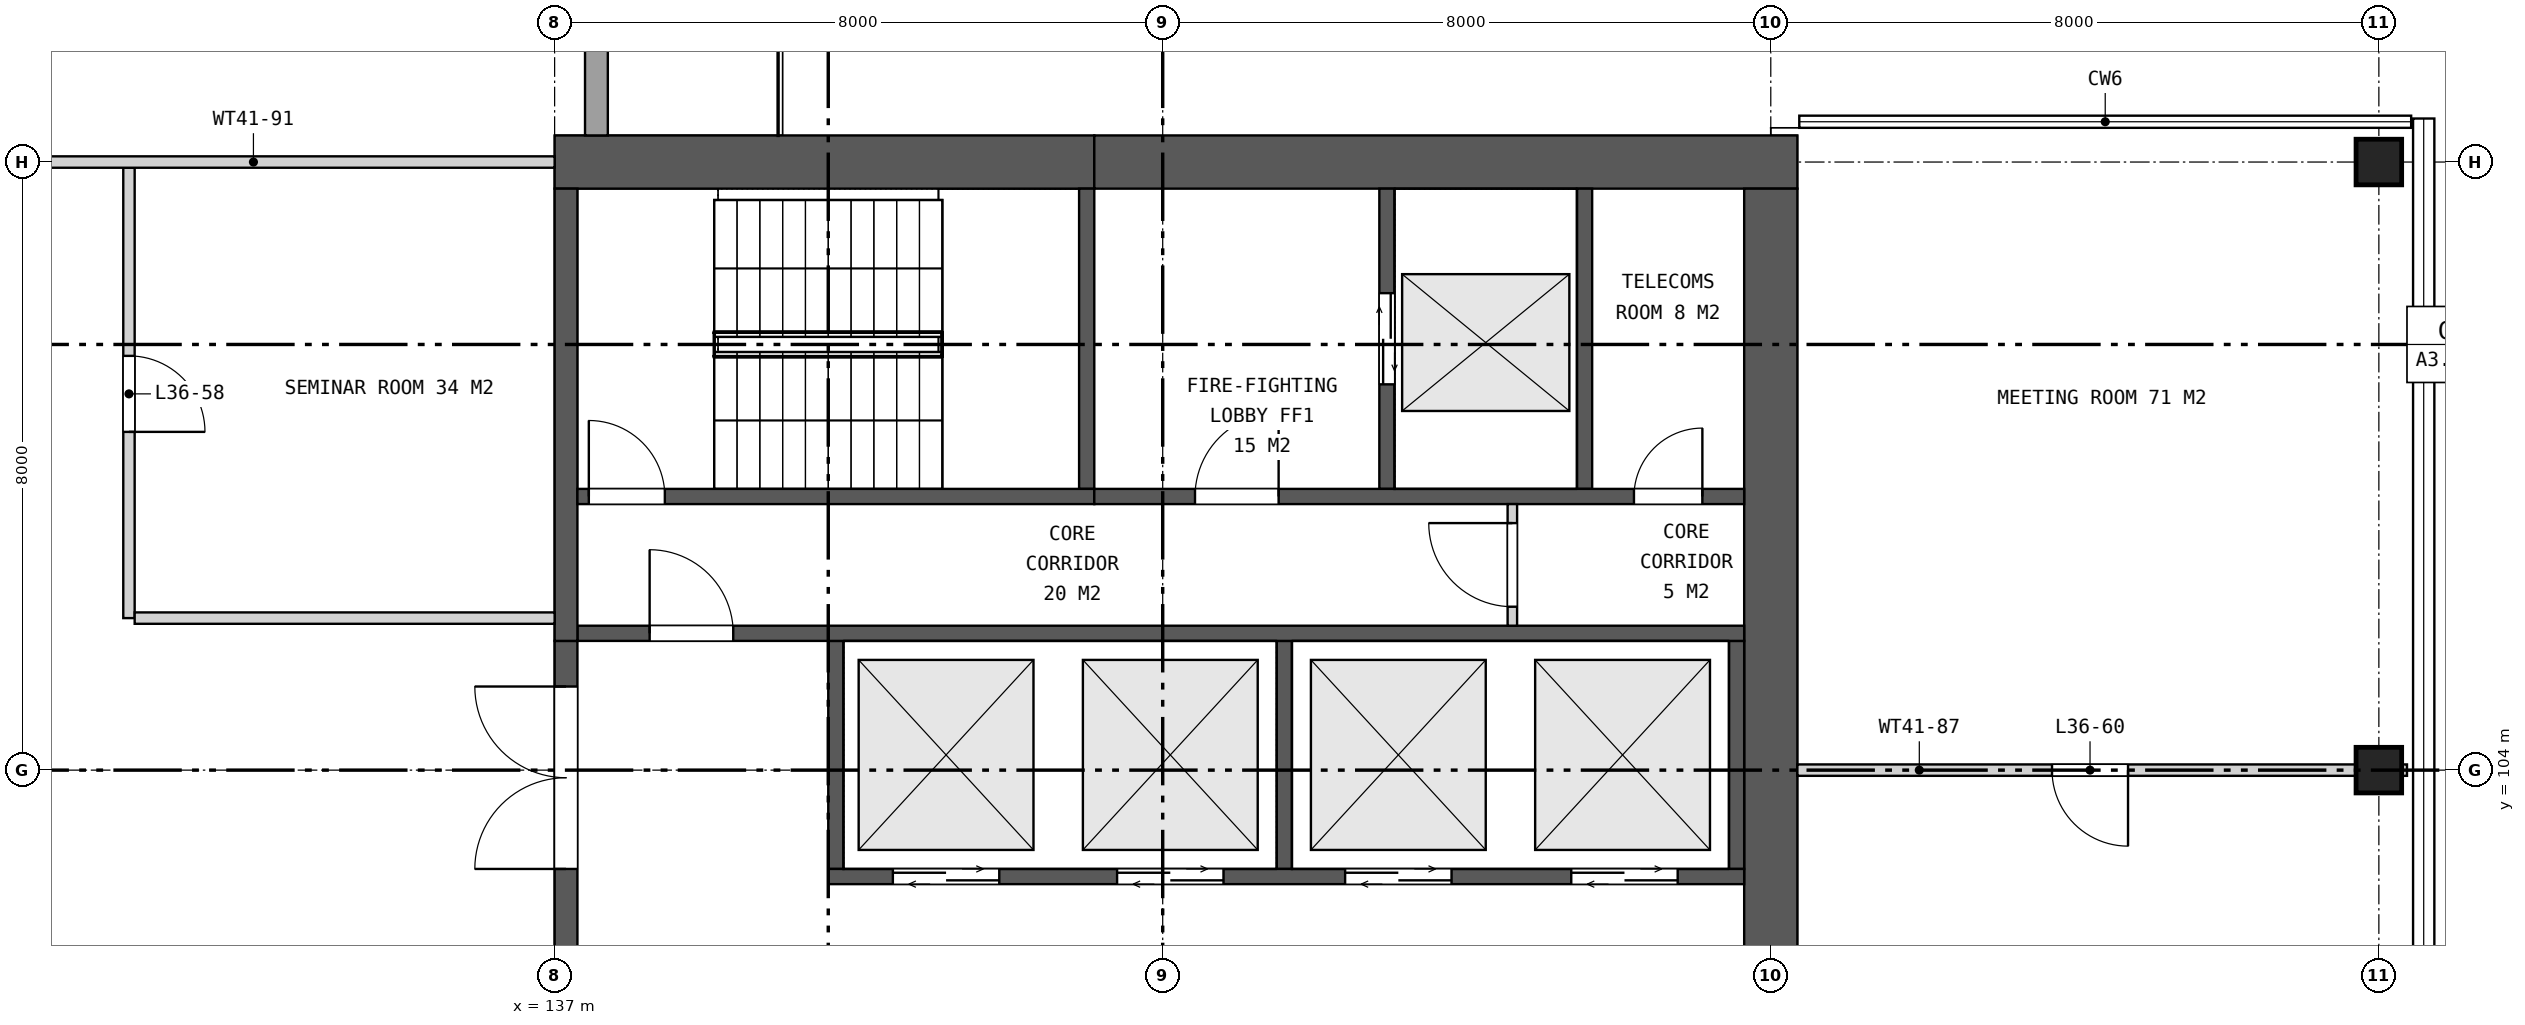
"""IFC4 building model, lengths in metres.
Left out: names, types, materials, properties, quantities, classifications, styles, units other than length and angle.
Written with IfcOpenShell. Run it as: python <this file> out.ifc"""

import sys

from ifc_helpers import new_model, si_unit, direction, frame, frame_2d, origin, origin_2d, place, context, subcontext, project, spatial, rectangle, extrude, element, fill, save


model = new_model("IFC4")
c1 = context("Model", 3, precision=1e-05, world=origin(), true_north=direction((0.0, 1.0)))
c2 = subcontext(c1, "Body", "Model", "MODEL_VIEW")
j1 = project(units=[si_unit("LENGTHUNIT", "METRE"), si_unit("PLANEANGLEUNIT", "RADIAN")], contexts=[c1])
p1 = place(None, origin())
s1 = spatial("IfcSite", under=j1, at=p1, CompositionType="ELEMENT")
p2 = place(p1, origin())
s2 = spatial("IfcBuilding", under=s1, at=p2, CompositionType="ELEMENT")
p3 = place(p2, frame((0.0, 0.0, 171.5)))
s3 = spatial("IfcBuildingStorey", under=s2, at=p3, CompositionType="ELEMENT", Elevation=171.5)
for number, where, z_axis, x_axis in (
    (1, (161.0, 104.0, 0.0), (0.0, 0.0, 1.0), (1.0, 0.0, 0.0)),
    (2, (161.0, 112.0, 0.0), (0.0, 0.0, 1.0), (1.0, 0.0, 0.0)),
):
    element("IfcColumn", number, at=place(p3, frame(where, z_axis=z_axis, x_axis=x_axis)), inside=s3, PredefinedType="COLUMN", context=c2, shape_type="SweptSolid", body=[
        extrude(rectangle(XDim=0.6, YDim=0.6, at=origin_2d()), origin(), (0.0, 0.0, 1.0), 7.4),
    ])
p4 = place(p3, frame((137.0, 112.0, 0.0), z_axis=(0.0, 0.0, 1.0), x_axis=(1.0, 0.0, 0.0)))
e3 = element("IfcWall", 3, at=p4, inside=s3, PredefinedType="SHEAR", context=c2, shape_type="SweptSolid", body=[
    extrude(rectangle(XDim=7.1, YDim=0.7, at=frame_2d((3.55, 0.0))), origin(), (0.0, 0.0, 1.0), 7.4),
])
p5 = place(p3, frame((144.1, 112.0, 0.0), z_axis=(0.0, 0.0, 1.0), x_axis=(1.0, 0.0, 0.0)))
e4 = element("IfcWall", 4, at=p5, inside=s3, PredefinedType="SHEAR", context=c2, shape_type="SweptSolid", body=[
    extrude(rectangle(XDim=9.25, YDim=0.7, at=frame_2d((4.625, 0.0))), origin(), (0.0, 0.0, 1.0), 7.4),
])
p6 = place(p3, frame((153.0, 88.35, 0.0), z_axis=(0.0, 0.0, 1.0), x_axis=(0.0, 1.0, 0.0)))
e5 = element("IfcWall", 5, at=p6, inside=s3, PredefinedType="SHEAR", context=c2, shape_type="SweptSolid", body=[
    extrude(rectangle(XDim=23.3, YDim=0.7, at=frame_2d((11.65, 0.0))), origin(), (0.0, 0.0, 1.0), 7.4),
])
p7 = place(p6, frame((10.45, 0.0, 0.0)))
e6 = element("IfcOpeningElement", 6, at=p7, cuts=e5, PredefinedType="OPENING", context=c2, shape_type="SweptSolid", body=[
    extrude(rectangle(XDim=2.4, YDim=2.4, at=frame_2d((1.2, 1.2))), frame((0.0, 0.36, 0.0), z_axis=(0.0, -1.0, 0.0), x_axis=(1.0, 0.0, 0.0)), (0.0, 0.0, 1.0), 0.72),
])
p8 = place(p3, frame((137.15, 94.3, 0.0), z_axis=(0.0, 0.0, 1.0), x_axis=(0.0, 1.0, 0.0)))
e7 = element("IfcWall", 7, at=p8, inside=s3, PredefinedType="SHEAR", context=c2, shape_type="SweptSolid", body=[
    extrude(rectangle(XDim=11.4, YDim=0.3, at=frame_2d((5.7, 0.0))), origin(), (0.0, 0.0, 1.0), 7.4),
])
p9 = place(p8, frame((0.6, 0.0, 0.0)))
e8 = element("IfcOpeningElement", 8, at=p9, cuts=e7, PredefinedType="OPENING", context=c2, shape_type="SweptSolid", body=[
    extrude(rectangle(XDim=2.4, YDim=2.4, at=frame_2d((1.2, 1.2))), frame((0.0, 0.16, 0.0), z_axis=(0.0, -1.0, 0.0), x_axis=(1.0, 0.0, 0.0)), (0.0, 0.0, 1.0), 0.32),
])
p10 = place(p8, frame((4.5, 0.0, 0.0)))
e9 = element("IfcOpeningElement", 9, at=p10, cuts=e7, PredefinedType="OPENING", context=c2, shape_type="SweptSolid", body=[
    extrude(rectangle(XDim=2.4, YDim=2.4, at=frame_2d((1.2, 1.2))), frame((0.0, 0.16, 0.0), z_axis=(0.0, -1.0, 0.0), x_axis=(1.0, 0.0, 0.0)), (0.0, 0.0, 1.0), 0.32),
])
p11 = place(p8, frame((8.4, 0.0, 0.0)))
e10 = element("IfcOpeningElement", 10, at=p11, cuts=e7, PredefinedType="OPENING", context=c2, shape_type="SweptSolid", body=[
    extrude(rectangle(XDim=2.4, YDim=2.4, at=frame_2d((1.2, 1.2))), frame((0.0, 0.16, 0.0), z_axis=(0.0, -1.0, 0.0), x_axis=(1.0, 0.0, 0.0)), (0.0, 0.0, 1.0), 0.32),
])
for number, where, z_axis, x_axis in (
    (11, (140.7, 102.7, 0.0), (0.0, 0.0, 1.0), (0.0, 1.0, 0.0)),
    (12, (146.6, 102.7, 0.0), (0.0, 0.0, 1.0), (0.0, 1.0, 0.0)),
    (13, (152.55, 102.7, 0.0), (0.0, 0.0, 1.0), (0.0, 1.0, 0.0)),
):
    element("IfcWall", number, at=place(p3, frame(where, z_axis=z_axis, x_axis=x_axis)), inside=s3, PredefinedType="SHEAR", context=c2, shape_type="SweptSolid", body=[
        extrude(rectangle(XDim=3.0, YDim=0.2, at=frame_2d((1.5, 0.0))), origin(), (0.0, 0.0, 1.0), 7.4),
    ])
p12 = place(p3, frame((140.6, 102.6, 0.0), z_axis=(0.0, 0.0, 1.0), x_axis=(1.0, 0.0, 0.0)))
e14 = element("IfcWall", 14, at=p12, inside=s3, PredefinedType="SHEAR", context=c2, shape_type="SweptSolid", body=[
    extrude(rectangle(XDim=12.05, YDim=0.2, at=frame_2d((6.025, 0.0))), origin(), (0.0, 0.0, 1.0), 7.4),
])
p13 = place(p12, frame((0.85, 0.0, 0.0)))
e15 = element("IfcOpeningElement", 15, at=p13, cuts=e14, PredefinedType="OPENING", context=c2, shape_type="SweptSolid", body=[
    extrude(rectangle(XDim=1.4, YDim=2.1, at=frame_2d((0.7, 1.05))), frame((0.0, 0.11, 0.0), z_axis=(0.0, -1.0, 0.0), x_axis=(1.0, 0.0, 0.0)), (0.0, 0.0, 1.0), 0.22),
])
p14 = place(p12, frame((3.8, 0.0, 0.0)))
e16 = element("IfcOpeningElement", 16, at=p14, cuts=e14, PredefinedType="OPENING", context=c2, shape_type="SweptSolid", body=[
    extrude(rectangle(XDim=1.4, YDim=2.1, at=frame_2d((0.7, 1.05))), frame((0.0, 0.11, 0.0), z_axis=(0.0, -1.0, 0.0), x_axis=(1.0, 0.0, 0.0)), (0.0, 0.0, 1.0), 0.22),
])
p15 = place(p12, frame((6.8, 0.0, 0.0)))
e17 = element("IfcOpeningElement", 17, at=p15, cuts=e14, PredefinedType="OPENING", context=c2, shape_type="SweptSolid", body=[
    extrude(rectangle(XDim=1.4, YDim=2.1, at=frame_2d((0.7, 1.05))), frame((0.0, 0.11, 0.0), z_axis=(0.0, -1.0, 0.0), x_axis=(1.0, 0.0, 0.0)), (0.0, 0.0, 1.0), 0.22),
])
p16 = place(p12, frame((9.775, 0.0, 0.0)))
e18 = element("IfcOpeningElement", 18, at=p16, cuts=e14, PredefinedType="OPENING", context=c2, shape_type="SweptSolid", body=[
    extrude(rectangle(XDim=1.4, YDim=2.1, at=frame_2d((0.7, 1.05))), frame((0.0, 0.11, 0.0), z_axis=(0.0, -1.0, 0.0), x_axis=(1.0, 0.0, 0.0)), (0.0, 0.0, 1.0), 0.22),
])
p17 = place(p3, frame((137.3, 105.8, 0.0), z_axis=(0.0, 0.0, 1.0), x_axis=(1.0, 0.0, 0.0)))
e19 = element("IfcWall", 19, at=p17, inside=s3, PredefinedType="SHEAR", context=c2, shape_type="SweptSolid", body=[
    extrude(rectangle(XDim=15.35, YDim=0.2, at=frame_2d((7.675, 0.0))), origin(), (0.0, 0.0, 1.0), 7.4),
])
p18 = place(p17, frame((0.95, 0.0, 0.0)))
e20 = element("IfcOpeningElement", 20, at=p18, cuts=e19, PredefinedType="OPENING", context=c2, shape_type="SweptSolid", body=[
    extrude(rectangle(XDim=1.1, YDim=2.1, at=frame_2d((0.55, 1.05))), frame((0.0, 0.11, 0.0), z_axis=(0.0, -1.0, 0.0), x_axis=(1.0, 0.0, 0.0)), (0.0, 0.0, 1.0), 0.22),
])
p19 = place(p3, frame((137.15, 105.7, 0.0), z_axis=(0.0, 0.0, 1.0), x_axis=(0.0, 1.0, 0.0)))
e21 = element("IfcWall", 21, at=p19, inside=s3, PredefinedType="SHEAR", context=c2, shape_type="SweptSolid", body=[
    extrude(rectangle(XDim=5.95, YDim=0.3, at=frame_2d((2.975, 0.0))), origin(), (0.0, 0.0, 1.0), 7.4),
])
p20 = place(p3, frame((144.0, 107.7, 0.0), z_axis=(0.0, 0.0, 1.0), x_axis=(0.0, 1.0, 0.0)))
e22 = element("IfcWall", 22, at=p20, inside=s3, PredefinedType="SHEAR", context=c2, shape_type="SweptSolid", body=[
    extrude(rectangle(XDim=3.95, YDim=0.2, at=frame_2d((1.975, 0.0))), origin(), (0.0, 0.0, 1.0), 7.4),
])
p21 = place(p3, frame((147.95, 107.7, 0.0), z_axis=(0.0, 0.0, 1.0), x_axis=(0.0, 1.0, 0.0)))
e23 = element("IfcWall", 23, at=p21, inside=s3, PredefinedType="SHEAR", context=c2, shape_type="SweptSolid", body=[
    extrude(rectangle(XDim=3.95, YDim=0.2, at=frame_2d((1.975, 0.0))), origin(), (0.0, 0.0, 1.0), 7.4),
])
p22 = place(p21, frame((1.375, 0.0, 0.0)))
e24 = element("IfcOpeningElement", 24, at=p22, cuts=e23, PredefinedType="OPENING", context=c2, shape_type="SweptSolid", body=[
    extrude(rectangle(XDim=1.2, YDim=2.1, at=frame_2d((0.6, 1.05))), frame((0.0, 0.11, 0.0), z_axis=(0.0, -1.0, 0.0), x_axis=(1.0, 0.0, 0.0)), (0.0, 0.0, 1.0), 0.22),
])
p23 = place(p3, frame((150.55, 107.7, 0.0), z_axis=(0.0, 0.0, 1.0), x_axis=(0.0, 1.0, 0.0)))
e25 = element("IfcWall", 25, at=p23, inside=s3, PredefinedType="SHEAR", context=c2, shape_type="SweptSolid", body=[
    extrude(rectangle(XDim=3.95, YDim=0.2, at=frame_2d((1.975, 0.0))), origin(), (0.0, 0.0, 1.0), 7.4),
])
p24 = place(p3, frame((137.3, 107.6, 0.0), z_axis=(0.0, 0.0, 1.0), x_axis=(1.0, 0.0, 0.0)))
e26 = element("IfcWall", 26, at=p24, inside=s3, PredefinedType="SHEAR", context=c2, shape_type="SweptSolid", body=[
    extrude(rectangle(XDim=6.8, YDim=0.2, at=frame_2d((3.4, 0.0))), origin(), (0.0, 0.0, 1.0), 7.4),
])
p25 = place(p24, frame((0.15, 0.0, 0.0)))
e27 = element("IfcOpeningElement", 27, at=p25, cuts=e26, PredefinedType="OPENING", context=c2, shape_type="SweptSolid", body=[
    extrude(rectangle(XDim=1.0, YDim=2.1, at=frame_2d((0.5, 1.05))), frame((0.0, 0.11, 0.0), z_axis=(0.0, -1.0, 0.0), x_axis=(1.0, 0.0, 0.0)), (0.0, 0.0, 1.0), 0.22),
])
p26 = place(p3, frame((144.1, 107.6, 0.0), z_axis=(0.0, 0.0, 1.0), x_axis=(1.0, 0.0, 0.0)))
e28 = element("IfcWall", 28, at=p26, inside=s3, PredefinedType="SHEAR", context=c2, shape_type="SweptSolid", body=[
    extrude(rectangle(XDim=8.55, YDim=0.2, at=frame_2d((4.275, 0.0))), origin(), (0.0, 0.0, 1.0), 7.4),
])
p27 = place(p26, frame((1.325, 0.0, 0.0)))
e29 = element("IfcOpeningElement", 29, at=p27, cuts=e28, PredefinedType="OPENING", context=c2, shape_type="SweptSolid", body=[
    extrude(rectangle(XDim=1.1, YDim=2.1, at=frame_2d((0.55, 1.05))), frame((0.0, 0.11, 0.0), z_axis=(0.0, -1.0, 0.0), x_axis=(1.0, 0.0, 0.0)), (0.0, 0.0, 1.0), 0.22),
])
p28 = place(p26, frame((7.1, 0.0, 0.0)))
e30 = element("IfcOpeningElement", 30, at=p28, cuts=e28, PredefinedType="OPENING", context=c2, shape_type="SweptSolid", body=[
    extrude(rectangle(XDim=0.9, YDim=2.1, at=frame_2d((0.45, 1.05))), frame((0.0, 0.11, 0.0), z_axis=(0.0, -1.0, 0.0), x_axis=(1.0, 0.0, 0.0)), (0.0, 0.0, 1.0), 0.22),
])
p29 = place(p3, frame((149.6, 105.9, 0.0), z_axis=(0.0, 0.0, 1.0), x_axis=(0.0, 1.0, 0.0)))
e31 = element("IfcWall", 31, at=p29, inside=s3, PredefinedType="PARTITIONING", context=c2, shape_type="SweptSolid", body=[
    extrude(rectangle(XDim=1.6, YDim=0.125, at=frame_2d((0.8, 0.0))), origin(), (0.0, 0.0, 1.0), 7.4),
])
p30 = place(p29, frame((0.25, 0.0, 0.0)))
e32 = element("IfcOpeningElement", 32, at=p30, cuts=e31, PredefinedType="OPENING", context=c2, shape_type="SweptSolid", body=[
    extrude(rectangle(XDim=1.1, YDim=2.1, at=frame_2d((0.55, 1.05))), frame((0.0, 0.073, 0.0), z_axis=(0.0, -1.0, 0.0), x_axis=(1.0, 0.0, 0.0)), (0.0, 0.0, 1.0), 0.145),
])
p31 = place(p3, frame((137.55, 112.35, 0.0), z_axis=(0.0, 0.0, 1.0), x_axis=(0.0, 1.0, 0.0)))
e33 = element("IfcWall", 33, at=p31, inside=s3, PredefinedType="SOLIDWALL", context=c2, shape_type="SweptSolid", body=[
    extrude(rectangle(XDim=7.612, YDim=0.3, at=frame_2d((3.806, 0.0))), origin(), (0.0, 0.0, 1.0), 7.1),
])
p32 = place(p31, frame((2.45, 0.0, 0.0)))
e34 = element("IfcOpeningElement", 34, at=p32, cuts=e33, PredefinedType="OPENING", context=c2, shape_type="SweptSolid", body=[
    extrude(rectangle(XDim=2.4, YDim=2.4, at=frame_2d((1.2, 1.2))), frame((0.0, 0.16, 0.0), z_axis=(0.0, -1.0, 0.0), x_axis=(1.0, 0.0, 0.0)), (0.0, 0.0, 1.0), 0.32),
])
p33 = place(p3, frame((131.4, 106.0, 0.0), z_axis=(0.0, 0.0, 1.0), x_axis=(0.0, 1.0, 0.0)))
e35 = element("IfcWall", 35, at=p33, inside=s3, PredefinedType="PARTITIONING", context=c2, shape_type="SweptSolid", body=[
    extrude(rectangle(XDim=5.925, YDim=0.15, at=frame_2d((2.962, 0.0))), origin(), (0.0, 0.0, 1.0), 6.64),
])
p34 = place(p33, frame((2.45, 0.0, 0.0)))
e36 = element("IfcOpeningElement", 36, at=p34, cuts=e35, PredefinedType="OPENING", context=c2, shape_type="SweptSolid", body=[
    extrude(rectangle(XDim=1.0, YDim=2.1, at=frame_2d((0.5, 1.05))), frame((0.0, 0.085, 0.0), z_axis=(0.0, -1.0, 0.0), x_axis=(1.0, 0.0, 0.0)), (0.0, 0.0, 1.0), 0.17),
])
p35 = place(p3, frame((153.35, 104.0, 0.0), z_axis=(0.0, 0.0, 1.0), x_axis=(1.0, 0.0, 0.0)))
e37 = element("IfcWall", 37, at=p35, inside=s3, PredefinedType="PARTITIONING", context=c2, shape_type="SweptSolid", body=[
    extrude(rectangle(XDim=8.02, YDim=0.15, at=frame_2d((4.01, 0.0))), origin(), (0.0, 0.0, 1.0), 6.64),
])
p36 = place(p35, frame((3.35, 0.0, 0.0)))
e38 = element("IfcOpeningElement", 38, at=p36, cuts=e37, PredefinedType="OPENING", context=c2, shape_type="SweptSolid", body=[
    extrude(rectangle(XDim=1.0, YDim=2.1, at=frame_2d((0.5, 1.05))), frame((0.0, 0.085, 0.0), z_axis=(0.0, -1.0, 0.0), x_axis=(1.0, 0.0, 0.0)), (0.0, 0.0, 1.0), 0.17),
])
p37 = place(p3, frame((131.475, 106.0, 0.0), z_axis=(0.0, 0.0, 1.0), x_axis=(1.0, 0.0, 0.0)))
e39 = element("IfcWall", 39, at=p37, inside=s3, PredefinedType="PARTITIONING", context=c2, shape_type="SweptSolid", body=[
    extrude(rectangle(XDim=5.525, YDim=0.15, at=frame_2d((2.762, 0.0))), origin(), (0.0, 0.0, 1.0), 6.64),
])
p38 = place(p3, frame((129.075, 112.0, 0.0), z_axis=(0.0, 0.0, 1.0), x_axis=(1.0, 0.0, 0.0)))
e40 = element("IfcWall", 40, at=p38, inside=s3, PredefinedType="PARTITIONING", context=c2, shape_type="SweptSolid", body=[
    extrude(rectangle(XDim=7.925, YDim=0.15, at=frame_2d((3.962, 0.0))), origin(), (0.0, 0.0, 1.0), 6.64),
])
p39 = place(p11, origin())
e41 = element("IfcDoor", 41, at=p39, inside=s3, OperationType="DOUBLE_DOOR_SINGLE_SWING", PredefinedType="DOOR", context=c2, shape_type="SweptSolid", body=[
    extrude(rectangle(XDim=2.4, YDim=2.4, at=frame_2d((1.2, 1.2))), frame((0.0, 0.025, 0.0), z_axis=(0.0, -1.0, 0.0), x_axis=(1.0, 0.0, 0.0)), (0.0, 0.0, 1.0), 0.05),
])
fill(e10, e41)
p40 = place(p13, origin())
e42 = element("IfcDoor", 42, at=p40, inside=s3, OperationType="DOUBLE_DOOR_SLIDING", PredefinedType="DOOR", context=c2, shape_type="SweptSolid", body=[
    extrude(rectangle(XDim=1.4, YDim=2.1, at=frame_2d((0.7, 1.05))), frame((0.0, 0.025, 0.0), z_axis=(0.0, -1.0, 0.0), x_axis=(1.0, 0.0, 0.0)), (0.0, 0.0, 1.0), 0.05),
])
fill(e15, e42)
p41 = place(p14, origin())
e43 = element("IfcDoor", 43, at=p41, inside=s3, OperationType="DOUBLE_DOOR_SLIDING", PredefinedType="DOOR", context=c2, shape_type="SweptSolid", body=[
    extrude(rectangle(XDim=1.4, YDim=2.1, at=frame_2d((0.7, 1.05))), frame((0.0, 0.025, 0.0), z_axis=(0.0, -1.0, 0.0), x_axis=(1.0, 0.0, 0.0)), (0.0, 0.0, 1.0), 0.05),
])
fill(e16, e43)
p42 = place(p15, origin())
e44 = element("IfcDoor", 44, at=p42, inside=s3, OperationType="DOUBLE_DOOR_SLIDING", PredefinedType="DOOR", context=c2, shape_type="SweptSolid", body=[
    extrude(rectangle(XDim=1.4, YDim=2.1, at=frame_2d((0.7, 1.05))), frame((0.0, 0.025, 0.0), z_axis=(0.0, -1.0, 0.0), x_axis=(1.0, 0.0, 0.0)), (0.0, 0.0, 1.0), 0.05),
])
fill(e17, e44)
p43 = place(p16, origin())
e45 = element("IfcDoor", 45, at=p43, inside=s3, OperationType="DOUBLE_DOOR_SLIDING", PredefinedType="DOOR", context=c2, shape_type="SweptSolid", body=[
    extrude(rectangle(XDim=1.4, YDim=2.1, at=frame_2d((0.7, 1.05))), frame((0.0, 0.025, 0.0), z_axis=(0.0, -1.0, 0.0), x_axis=(1.0, 0.0, 0.0)), (0.0, 0.0, 1.0), 0.05),
])
fill(e18, e45)
p44 = place(p18, origin())
e46 = element("IfcDoor", 46, at=p44, inside=s3, OperationType="SINGLE_SWING_LEFT", PredefinedType="DOOR", context=c2, shape_type="SweptSolid", body=[
    extrude(rectangle(XDim=1.1, YDim=2.1, at=frame_2d((0.55, 1.05))), frame((0.0, 0.025, 0.0), z_axis=(0.0, -1.0, 0.0), x_axis=(1.0, 0.0, 0.0)), (0.0, 0.0, 1.0), 0.05),
])
fill(e20, e46)
p45 = place(p22, origin())
e47 = element("IfcDoor", 47, at=p45, inside=s3, OperationType="DOUBLE_DOOR_SLIDING", PredefinedType="DOOR", context=c2, shape_type="SweptSolid", body=[
    extrude(rectangle(XDim=1.2, YDim=2.1, at=frame_2d((0.6, 1.05))), frame((0.0, 0.025, 0.0), z_axis=(0.0, -1.0, 0.0), x_axis=(1.0, 0.0, 0.0)), (0.0, 0.0, 1.0), 0.05),
])
fill(e24, e47)
p46 = place(p25, origin())
e48 = element("IfcDoor", 48, at=p46, inside=s3, OperationType="SINGLE_SWING_LEFT", PredefinedType="DOOR", context=c2, shape_type="SweptSolid", body=[
    extrude(rectangle(XDim=1.0, YDim=2.1, at=frame_2d((0.5, 1.05))), frame((0.0, 0.025, 0.0), z_axis=(0.0, -1.0, 0.0), x_axis=(1.0, 0.0, 0.0)), (0.0, 0.0, 1.0), 0.05),
])
fill(e27, e48)
p47 = place(p27, origin())
e49 = element("IfcDoor", 49, at=p47, inside=s3, OperationType="SINGLE_SWING_RIGHT", PredefinedType="DOOR", context=c2, shape_type="SweptSolid", body=[
    extrude(rectangle(XDim=1.1, YDim=2.1, at=frame_2d((0.55, 1.05))), frame((0.0, 0.025, 0.0), z_axis=(0.0, -1.0, 0.0), x_axis=(1.0, 0.0, 0.0)), (0.0, 0.0, 1.0), 0.05),
])
fill(e29, e49)
p48 = place(p28, origin())
e50 = element("IfcDoor", 50, at=p48, inside=s3, OperationType="SINGLE_SWING_RIGHT", PredefinedType="DOOR", context=c2, shape_type="SweptSolid", body=[
    extrude(rectangle(XDim=0.9, YDim=2.1, at=frame_2d((0.45, 1.05))), frame((0.0, 0.025, 0.0), z_axis=(0.0, -1.0, 0.0), x_axis=(1.0, 0.0, 0.0)), (0.0, 0.0, 1.0), 0.05),
])
fill(e30, e50)
p49 = place(p30, origin())
e51 = element("IfcDoor", 51, at=p49, inside=s3, OperationType="SINGLE_SWING_RIGHT", PredefinedType="DOOR", context=c2, shape_type="SweptSolid", body=[
    extrude(rectangle(XDim=1.1, YDim=2.1, at=frame_2d((0.55, 1.05))), frame((0.0, 0.025, 0.0), z_axis=(0.0, -1.0, 0.0), x_axis=(1.0, 0.0, 0.0)), (0.0, 0.0, 1.0), 0.05),
])
fill(e32, e51)
p50 = place(p34, frame((1.0, 0.0, 0.0), z_axis=(0.0, 0.0, 1.0), x_axis=(-1.0, 0.0, 0.0)))
e52 = element("IfcDoor", 52, at=p50, inside=s3, OperationType="SINGLE_SWING_RIGHT", PredefinedType="DOOR", context=c2, shape_type="SweptSolid", body=[
    extrude(rectangle(XDim=1.0, YDim=2.1, at=frame_2d((0.5, 1.05))), frame((0.0, 0.025, 0.0), z_axis=(0.0, -1.0, 0.0), x_axis=(1.0, 0.0, 0.0)), (0.0, 0.0, 1.0), 0.05),
])
fill(e36, e52)
p51 = place(p36, frame((1.0, 0.0, 0.0), z_axis=(0.0, 0.0, 1.0), x_axis=(-1.0, 0.0, 0.0)))
e53 = element("IfcDoor", 53, at=p51, inside=s3, OperationType="SINGLE_SWING_LEFT", PredefinedType="DOOR", context=c2, shape_type="SweptSolid", body=[
    extrude(rectangle(XDim=1.0, YDim=2.1, at=frame_2d((0.5, 1.05))), frame((0.0, 0.025, 0.0), z_axis=(0.0, -1.0, 0.0), x_axis=(1.0, 0.0, 0.0)), (0.0, 0.0, 1.0), 0.05),
])
fill(e38, e53)
save(model, sys.argv[1])
